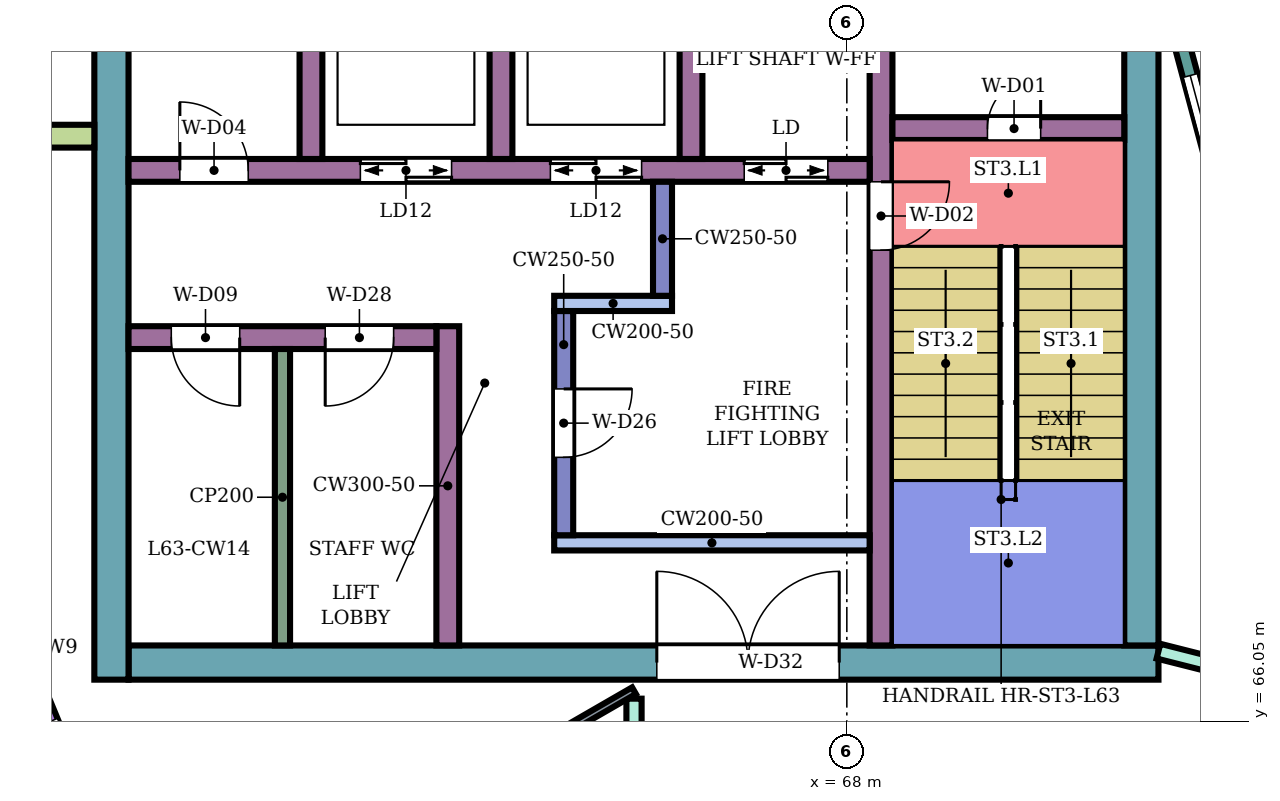
"""IFC4 building model, lengths in metres.
Left out: names, types, materials, properties, quantities, classifications, styles, units other than length and angle.
Written with IfcOpenShell. Run it as: python <this file> out.ifc"""

import sys

from ifc_helpers import new_model, si_unit, direction, frame, frame_2d, origin, place, context, subcontext, project, spatial, rectangle, extrude, element, fill, save


model = new_model("IFC4")
c1 = context("Model", 3, precision=1e-05, world=origin(), true_north=direction((0.0, 1.0)))
c2 = subcontext(c1, "Body", "Model", "MODEL_VIEW")
j1 = project(units=[si_unit("LENGTHUNIT", "METRE"), si_unit("PLANEANGLEUNIT", "RADIAN")], contexts=[c1])
p1 = place(None, origin())
s1 = spatial("IfcSite", under=j1, at=p1, CompositionType="ELEMENT")
p2 = place(p1, origin())
s2 = spatial("IfcBuilding", under=s1, at=p2, CompositionType="ELEMENT")
p3 = place(p2, frame((0.0, 0.0, 275.7)))
s3 = spatial("IfcBuildingStorey", under=s2, at=p3, CompositionType="ELEMENT", Elevation=275.7)
p4 = place(p3, frame((72.1, 66.825, 0.0), z_axis=(0.0, 0.0, 1.0), x_axis=(-1.0, 0.0, 0.0)))
e1 = element("IfcWall", 1, at=p4, inside=s3, PredefinedType="SHEAR", context=c2, shape_type="SweptSolid", body=[
    extrude(rectangle(XDim=13.55, YDim=0.45, at=frame_2d((6.775, 0.0))), origin(), (0.0, 0.0, 1.0), 3.88),
])
p5 = place(p4, frame((4.2, 0.0, 0.0)))
e2 = element("IfcOpeningElement", 2, at=p5, cuts=e1, PredefinedType="OPENING", context=c2, shape_type="SweptSolid", body=[
    extrude(rectangle(XDim=2.4, YDim=2.4, at=frame_2d((1.2, 1.2))), frame((0.0, 0.235, 0.0), z_axis=(0.0, -1.0, 0.0), x_axis=(1.0, 0.0, 0.0)), (0.0, 0.0, 1.0), 0.47),
])
p6 = place(p3, frame((71.875, 75.0, 0.0), z_axis=(0.0, 0.0, 1.0), x_axis=(0.0, -1.0, 0.0)))
e3 = element("IfcWall", 3, at=p6, inside=s3, PredefinedType="SHEAR", context=c2, shape_type="SweptSolid", body=[
    extrude(rectangle(XDim=7.95, YDim=0.45, at=frame_2d((3.975, 0.0))), origin(), (0.0, 0.0, 1.0), 3.88),
])
p7 = place(p3, frame((58.325, 83.4, 0.0), z_axis=(0.0, 0.0, 1.0), x_axis=(0.0, -1.0, 0.0)))
e4 = element("IfcWall", 4, at=p7, inside=s3, PredefinedType="SHEAR", context=c2, shape_type="SweptSolid", body=[
    extrude(rectangle(XDim=16.8, YDim=0.45, at=frame_2d((8.4, 0.0))), origin(), (0.0, 0.0, 1.0), 3.88),
])
p8 = place(p3, frame((68.45, 75.0, 0.0), z_axis=(0.0, 0.0, 1.0), x_axis=(0.0, -1.0, 0.0)))
e5 = element("IfcWall", 5, at=p8, inside=s3, PredefinedType="SHEAR", context=c2, shape_type="SweptSolid", body=[
    extrude(rectangle(XDim=7.95, YDim=0.3, at=frame_2d((3.975, 0.0))), origin(), (0.0, 0.0, 1.0), 3.88),
])
p9 = place(p8, frame((1.85, 0.0, 0.0)))
e6 = element("IfcOpeningElement", 6, at=p9, cuts=e5, PredefinedType="OPENING", context=c2, shape_type="SweptSolid", body=[
    extrude(rectangle(XDim=0.9, YDim=2.1, at=frame_2d((0.45, 1.05))), frame((0.0, 0.16, 0.0), z_axis=(0.0, -1.0, 0.0), x_axis=(1.0, 0.0, 0.0)), (0.0, 0.0, 1.0), 0.32),
])
p10 = place(p3, frame((71.65, 73.85, 0.0), z_axis=(0.0, 0.0, 1.0), x_axis=(-1.0, 0.0, 0.0)))
e7 = element("IfcWall", 7, at=p10, inside=s3, PredefinedType="SHEAR", context=c2, shape_type="SweptSolid", body=[
    extrude(rectangle(XDim=3.05, YDim=0.3, at=frame_2d((1.525, 0.0))), origin(), (0.0, 0.0, 1.0), 3.88),
])
p11 = place(p10, frame((1.1, 0.0, 0.0)))
e8 = element("IfcOpeningElement", 8, at=p11, cuts=e7, PredefinedType="OPENING", context=c2, shape_type="SweptSolid", body=[
    extrude(rectangle(XDim=0.7, YDim=2.0, at=frame_2d((0.35, 1.0))), frame((0.0, 0.16, 0.0), z_axis=(0.0, -1.0, 0.0), x_axis=(1.0, 0.0, 0.0)), (0.0, 0.0, 1.0), 0.32),
])
p12 = place(p3, frame((68.3, 73.3, 0.0), z_axis=(0.0, 0.0, 1.0), x_axis=(-1.0, 0.0, 0.0)))
e9 = element("IfcWall", 9, at=p12, inside=s3, PredefinedType="SHEAR", context=c2, shape_type="SweptSolid", body=[
    extrude(rectangle(XDim=9.75, YDim=0.3, at=frame_2d((4.875, 0.0))), origin(), (0.0, 0.0, 1.0), 3.88),
])
p13 = place(p12, frame((0.55, 0.0, 0.0)))
e10 = element("IfcOpeningElement", 10, at=p13, cuts=e9, PredefinedType="OPENING", context=c2, shape_type="SweptSolid", body=[
    extrude(rectangle(XDim=1.1, YDim=2.1, at=frame_2d((0.55, 1.05))), frame((0.0, 0.16, 0.0), z_axis=(0.0, -1.0, 0.0), x_axis=(1.0, 0.0, 0.0)), (0.0, 0.0, 1.0), 0.32),
])
p14 = place(p12, frame((3.0, 0.0, 0.0)))
e11 = element("IfcOpeningElement", 11, at=p14, cuts=e9, PredefinedType="OPENING", context=c2, shape_type="SweptSolid", body=[
    extrude(rectangle(XDim=1.2, YDim=2.1, at=frame_2d((0.6, 1.05))), frame((0.0, 0.16, 0.0), z_axis=(0.0, -1.0, 0.0), x_axis=(1.0, 0.0, 0.0)), (0.0, 0.0, 1.0), 0.32),
])
p15 = place(p12, frame((5.5, 0.0, 0.0)))
e12 = element("IfcOpeningElement", 12, at=p15, cuts=e9, PredefinedType="OPENING", context=c2, shape_type="SweptSolid", body=[
    extrude(rectangle(XDim=1.2, YDim=2.1, at=frame_2d((0.6, 1.05))), frame((0.0, 0.16, 0.0), z_axis=(0.0, -1.0, 0.0), x_axis=(1.0, 0.0, 0.0)), (0.0, 0.0, 1.0), 0.32),
])
p16 = place(p12, frame((8.175, 0.0, 0.0)))
e13 = element("IfcOpeningElement", 13, at=p16, cuts=e9, PredefinedType="OPENING", context=c2, shape_type="SweptSolid", body=[
    extrude(rectangle(XDim=0.9, YDim=2.1, at=frame_2d((0.45, 1.05))), frame((0.0, 0.16, 0.0), z_axis=(0.0, -1.0, 0.0), x_axis=(1.0, 0.0, 0.0)), (0.0, 0.0, 1.0), 0.32),
])
for number, where, z_axis, x_axis in (
    (14, (65.95, 76.0, 0.0), (0.0, 0.0, 1.0), (0.0, -1.0, 0.0)),
    (15, (63.45, 76.0, 0.0), (0.0, 0.0, 1.0), (0.0, -1.0, 0.0)),
    (16, (60.95, 76.0, 0.0), (0.0, 0.0, 1.0), (0.0, -1.0, 0.0)),
):
    element("IfcWall", number, at=place(p3, frame(where, z_axis=z_axis, x_axis=x_axis)), inside=s3, PredefinedType="SHEAR", context=c2, shape_type="SweptSolid", body=[
        extrude(rectangle(XDim=2.55, YDim=0.3, at=frame_2d((1.275, 0.0))), origin(), (0.0, 0.0, 1.0), 3.88),
    ])
p17 = place(p3, frame((68.3, 68.4, 0.0), z_axis=(0.0, 0.0, 1.0), x_axis=(-1.0, 0.0, 0.0)))
e17 = element("IfcWall", 17, at=p17, inside=s3, PredefinedType="SHEAR", context=c2, shape_type="SweptSolid", body=[
    extrude(rectangle(XDim=4.15, YDim=0.2, at=frame_2d((2.075, 0.0))), origin(), (0.0, 0.0, 1.0), 3.88),
])
p18 = place(p3, frame((64.275, 71.45, 0.0), z_axis=(0.0, 0.0, 1.0), x_axis=(0.0, -1.0, 0.0)))
e18 = element("IfcWall", 18, at=p18, inside=s3, PredefinedType="SHEAR", context=c2, shape_type="SweptSolid", body=[
    extrude(rectangle(XDim=2.95, YDim=0.25, at=frame_2d((1.475, 0.0))), origin(), (0.0, 0.0, 1.0), 3.88),
])
p19 = place(p18, frame((1.025, 0.0, 0.0)))
e19 = element("IfcOpeningElement", 19, at=p19, cuts=e18, PredefinedType="OPENING", context=c2, shape_type="SweptSolid", body=[
    extrude(rectangle(XDim=0.9, YDim=2.1, at=frame_2d((0.45, 1.05))), frame((0.0, 0.135, 0.0), z_axis=(0.0, -1.0, 0.0), x_axis=(1.0, 0.0, 0.0)), (0.0, 0.0, 1.0), 0.27),
])
p20 = place(p3, frame((65.7, 71.55, 0.0), z_axis=(0.0, 0.0, 1.0), x_axis=(-1.0, 0.0, 0.0)))
e20 = element("IfcWall", 20, at=p20, inside=s3, PredefinedType="SHEAR", context=c2, shape_type="SweptSolid", body=[
    extrude(rectangle(XDim=1.55, YDim=0.2, at=frame_2d((0.775, 0.0))), origin(), (0.0, 0.0, 1.0), 3.88),
])
p21 = place(p3, frame((65.575, 73.15, 0.0), z_axis=(0.0, 0.0, 1.0), x_axis=(0.0, -1.0, 0.0)))
e21 = element("IfcWall", 21, at=p21, inside=s3, PredefinedType="SHEAR", context=c2, shape_type="SweptSolid", body=[
    extrude(rectangle(XDim=1.5, YDim=0.25, at=frame_2d((0.75, 0.0))), origin(), (0.0, 0.0, 1.0), 3.88),
])
p22 = place(p3, frame((62.75, 71.25, 0.0), z_axis=(0.0, 0.0, 1.0), x_axis=(0.0, -1.0, 0.0)))
e22 = element("IfcWall", 22, at=p22, inside=s3, PredefinedType="SHEAR", context=c2, shape_type="SweptSolid", body=[
    extrude(rectangle(XDim=4.2, YDim=0.3, at=frame_2d((2.1, 0.0))), origin(), (0.0, 0.0, 1.0), 3.88),
])
p23 = place(p3, frame((62.6, 71.1, 0.0), z_axis=(0.0, 0.0, 1.0), x_axis=(-1.0, 0.0, 0.0)))
e23 = element("IfcWall", 23, at=p23, inside=s3, PredefinedType="SHEAR", context=c2, shape_type="SweptSolid", body=[
    extrude(rectangle(XDim=4.05, YDim=0.3, at=frame_2d((2.025, 0.0))), origin(), (0.0, 0.0, 1.0), 3.88),
])
p24 = place(p23, frame((0.562, 0.0, 0.0)))
e24 = element("IfcOpeningElement", 24, at=p24, cuts=e23, PredefinedType="OPENING", context=c2, shape_type="SweptSolid", body=[
    extrude(rectangle(XDim=0.9, YDim=2.1, at=frame_2d((0.45, 1.05))), frame((0.0, 0.16, 0.0), z_axis=(0.0, -1.0, 0.0), x_axis=(1.0, 0.0, 0.0)), (0.0, 0.0, 1.0), 0.32),
])
p25 = place(p23, frame((2.587, 0.0, 0.0)))
e25 = element("IfcOpeningElement", 25, at=p25, cuts=e23, PredefinedType="OPENING", context=c2, shape_type="SweptSolid", body=[
    extrude(rectangle(XDim=0.9, YDim=2.1, at=frame_2d((0.45, 1.05))), frame((0.0, 0.16, 0.0), z_axis=(0.0, -1.0, 0.0), x_axis=(1.0, 0.0, 0.0)), (0.0, 0.0, 1.0), 0.32),
])
p26 = place(p3, frame((56.432, 68.685, 0.0), z_axis=(0.0, 0.0, 1.0), x_axis=(0.382690319485, -0.923876679743, 0.0)))
e26 = element("IfcWall", 26, at=p26, inside=s3, PredefinedType="NOTDEFINED", context=c2, shape_type="SweptSolid", body=[
    extrude(rectangle(XDim=6.369, YDim=0.2, at=frame_2d((3.185, 0.0))), origin(), (0.0, 0.0, 1.0), 4.2),
])
p27 = place(p26, frame((1.2, 0.0, 0.9)))
e27 = element("IfcOpeningElement", 27, at=p27, cuts=e26, PredefinedType="OPENING", context=c2, shape_type="SweptSolid", body=[
    extrude(rectangle(XDim=1.2, YDim=2.7, at=frame_2d((0.6, 1.35))), frame((0.0, 0.11, 0.0), z_axis=(0.0, -1.0, 0.0), x_axis=(1.0, 0.0, 0.0)), (0.0, 0.0, 1.0), 0.22),
])
p28 = place(p26, frame((2.85, 0.0, 0.0)))
e28 = element("IfcOpeningElement", 28, at=p28, cuts=e26, PredefinedType="OPENING", context=c2, shape_type="SweptSolid", body=[
    extrude(rectangle(XDim=1.8, YDim=2.7, at=frame_2d((0.9, 1.35))), frame((0.0, 0.11, 0.0), z_axis=(0.0, -1.0, 0.0), x_axis=(1.0, 0.0, 0.0)), (0.0, 0.0, 1.0), 0.22),
])
p29 = place(p3, frame((58.1, 73.75, 0.0), z_axis=(0.0, 0.0, 1.0), x_axis=(-1.0, 0.0, 0.0)))
e29 = element("IfcWall", 29, at=p29, inside=s3, PredefinedType="NOTDEFINED", context=c2, shape_type="SweptSolid", body=[
    extrude(rectangle(XDim=2.416, YDim=0.3, at=frame_2d((1.208, 0.0))), origin(), (0.0, 0.0, 1.0), 4.2),
])
p30 = place(p3, frame((72.396, 75.0, 0.0), z_axis=(0.0, 0.0, 1.0), x_axis=(0.258789828301, -0.965933654434, 0.0)))
e30 = element("IfcWall", 30, at=p30, inside=s3, PredefinedType="NOTDEFINED", context=c2, shape_type="SweptSolid", body=[
    extrude(rectangle(XDim=3.936, YDim=0.2, at=frame_2d((1.968, 0.0))), origin(), (0.0, 0.0, 1.0), 4.2),
])
p31 = place(p30, frame((0.468, 0.0, 0.9)))
e31 = element("IfcOpeningElement", 31, at=p31, cuts=e30, PredefinedType="OPENING", context=c2, shape_type="SweptSolid", body=[
    extrude(rectangle(XDim=3.0, YDim=2.3, at=frame_2d((1.5, 1.15))), frame((0.0, 0.11, 0.0), z_axis=(0.0, -1.0, 0.0), x_axis=(1.0, 0.0, 0.0)), (0.0, 0.0, 1.0), 0.22),
])
p32 = place(p3, frame((65.2, 65.2, 0.0), z_axis=(0.0, 0.0, 1.0), x_axis=(0.0, 1.0, 0.0)))
e32 = element("IfcWall", 32, at=p32, inside=s3, PredefinedType="PARTITIONING", context=c2, shape_type="SweptSolid", body=[
    extrude(rectangle(XDim=1.15, YDim=0.2, at=frame_2d((0.575, 0.0))), origin(), (0.0, 0.0, 1.0), 3.75),
])
p33 = place(p3, frame((72.1, 66.975, 0.0), z_axis=(0.0, 0.0, 1.0), x_axis=(0.969471314457, -0.245204752086, 0.0)))
e33 = element("IfcWall", 33, at=p33, inside=s3, PredefinedType="PARTITIONING", context=c2, shape_type="SweptSolid", body=[
    extrude(rectangle(XDim=2.582, YDim=0.2, at=frame_2d((1.291, 0.0))), origin(), (0.0, 0.0, 1.0), 3.75),
])
p34 = place(p33, frame((0.841, 0.0, 0.0)))
e34 = element("IfcOpeningElement", 34, at=p34, cuts=e33, PredefinedType="OPENING", context=c2, shape_type="SweptSolid", body=[
    extrude(rectangle(XDim=0.9, YDim=2.1, at=frame_2d((0.45, 1.05))), frame((0.0, 0.11, 0.0), z_axis=(0.0, -1.0, 0.0), x_axis=(1.0, 0.0, 0.0)), (0.0, 0.0, 1.0), 0.22),
])
p35 = place(p3, frame((58.958, 62.851, 0.0), z_axis=(0.0, 0.0, 1.0), x_axis=(0.866044015472, 0.499967762227, 0.0)))
e35 = element("IfcWall", 35, at=p35, inside=s3, PredefinedType="PARTITIONING", context=c2, shape_type="SweptSolid", body=[
    extrude(rectangle(XDim=7.208, YDim=0.1, at=frame_2d((3.604, 0.0))), origin(), (0.0, 0.0, 1.0), 3.75),
])
p36 = place(p35, frame((3.179, 0.0, 0.0)))
e36 = element("IfcOpeningElement", 36, at=p36, cuts=e35, PredefinedType="OPENING", context=c2, shape_type="SweptSolid", body=[
    extrude(rectangle(XDim=0.9, YDim=2.1, at=frame_2d((0.45, 1.05))), frame((0.0, 0.06, 0.0), z_axis=(0.0, -1.0, 0.0), x_axis=(1.0, 0.0, 0.0)), (0.0, 0.0, 1.0), 0.12),
])
p37 = place(p3, frame((60.575, 70.95, 0.0), z_axis=(0.0, 0.0, 1.0), x_axis=(0.0, -1.0, 0.0)))
e37 = element("IfcWall", 37, at=p37, inside=s3, PredefinedType="PARTITIONING", context=c2, shape_type="SweptSolid", body=[
    extrude(rectangle(XDim=3.9, YDim=0.2, at=frame_2d((1.95, 0.0))), origin(), (0.0, 0.0, 1.0), 3.88),
])
p38 = place(p28, frame((1.8, 0.0, 0.0), z_axis=(0.0, 0.0, 1.0), x_axis=(-1.0, 0.0, 0.0)))
e38 = element("IfcDoor", 38, at=p38, inside=s3, OperationType="DOUBLE_DOOR_SINGLE_SWING", PredefinedType="DOOR", context=c2, shape_type="SweptSolid", body=[
    extrude(rectangle(XDim=1.8, YDim=2.7, at=frame_2d((0.9, 1.35))), frame((0.0, 0.025, 0.0), z_axis=(0.0, -1.0, 0.0), x_axis=(1.0, 0.0, 0.0)), (0.0, 0.0, 1.0), 0.05),
])
fill(e28, e38)
p39 = place(p31, origin())
e39 = element("IfcWindow", 39, at=p39, inside=s3, PartitioningType="SINGLE_PANEL", PredefinedType="WINDOW", context=c2, shape_type="SweptSolid", body=[
    extrude(rectangle(XDim=3.0, YDim=2.3, at=frame_2d((1.5, 1.15))), frame((0.0, 0.03, 0.0), z_axis=(0.0, -1.0, 0.0), x_axis=(1.0, 0.0, 0.0)), (0.0, 0.0, 1.0), 0.06),
])
fill(e31, e39)
p40 = place(p11, frame((0.7, 0.0, 0.0), z_axis=(0.0, 0.0, 1.0), x_axis=(-1.0, 0.0, 0.0)))
e40 = element("IfcDoor", 40, at=p40, inside=s3, OperationType="SINGLE_SWING_RIGHT", PredefinedType="DOOR", context=c2, shape_type="SweptSolid", body=[
    extrude(rectangle(XDim=0.7, YDim=2.0, at=frame_2d((0.35, 1.0))), frame((0.0, 0.025, 0.0), z_axis=(0.0, -1.0, 0.0), x_axis=(1.0, 0.0, 0.0)), (0.0, 0.0, 1.0), 0.05),
])
fill(e8, e40)
p41 = place(p9, origin())
e41 = element("IfcDoor", 41, at=p41, inside=s3, OperationType="SINGLE_SWING_LEFT", PredefinedType="DOOR", context=c2, shape_type="SweptSolid", body=[
    extrude(rectangle(XDim=0.9, YDim=2.1, at=frame_2d((0.45, 1.05))), frame((0.0, 0.025, 0.0), z_axis=(0.0, -1.0, 0.0), x_axis=(1.0, 0.0, 0.0)), (0.0, 0.0, 1.0), 0.05),
])
fill(e6, e41)
p42 = place(p13, origin())
e42 = element("IfcDoor", 42, at=p42, inside=s3, OperationType="DOUBLE_DOOR_SLIDING", PredefinedType="DOOR", context=c2, shape_type="SweptSolid", body=[
    extrude(rectangle(XDim=1.1, YDim=2.1, at=frame_2d((0.55, 1.05))), frame((0.0, 0.025, 0.0), z_axis=(0.0, -1.0, 0.0), x_axis=(1.0, 0.0, 0.0)), (0.0, 0.0, 1.0), 0.05),
])
fill(e10, e42)
p43 = place(p14, origin())
e43 = element("IfcDoor", 43, at=p43, inside=s3, OperationType="DOUBLE_DOOR_SLIDING", PredefinedType="DOOR", context=c2, shape_type="SweptSolid", body=[
    extrude(rectangle(XDim=1.2, YDim=2.1, at=frame_2d((0.6, 1.05))), frame((0.0, 0.025, 0.0), z_axis=(0.0, -1.0, 0.0), x_axis=(1.0, 0.0, 0.0)), (0.0, 0.0, 1.0), 0.05),
])
fill(e11, e43)
p44 = place(p15, origin())
e44 = element("IfcDoor", 44, at=p44, inside=s3, OperationType="DOUBLE_DOOR_SLIDING", PredefinedType="DOOR", context=c2, shape_type="SweptSolid", body=[
    extrude(rectangle(XDim=1.2, YDim=2.1, at=frame_2d((0.6, 1.05))), frame((0.0, 0.025, 0.0), z_axis=(0.0, -1.0, 0.0), x_axis=(1.0, 0.0, 0.0)), (0.0, 0.0, 1.0), 0.05),
])
fill(e12, e44)
p45 = place(p16, frame((0.9, 0.0, 0.0), z_axis=(0.0, 0.0, 1.0), x_axis=(-1.0, 0.0, 0.0)))
e45 = element("IfcDoor", 45, at=p45, inside=s3, OperationType="SINGLE_SWING_LEFT", PredefinedType="DOOR", context=c2, shape_type="SweptSolid", body=[
    extrude(rectangle(XDim=0.9, YDim=2.1, at=frame_2d((0.45, 1.05))), frame((0.0, 0.025, 0.0), z_axis=(0.0, -1.0, 0.0), x_axis=(1.0, 0.0, 0.0)), (0.0, 0.0, 1.0), 0.05),
])
fill(e13, e45)
p46 = place(p19, origin())
e46 = element("IfcDoor", 46, at=p46, inside=s3, OperationType="SINGLE_SWING_LEFT", PredefinedType="DOOR", context=c2, shape_type="SweptSolid", body=[
    extrude(rectangle(XDim=0.9, YDim=2.1, at=frame_2d((0.45, 1.05))), frame((0.0, 0.025, 0.0), z_axis=(0.0, -1.0, 0.0), x_axis=(1.0, 0.0, 0.0)), (0.0, 0.0, 1.0), 0.05),
])
fill(e19, e46)
p47 = place(p24, origin())
e47 = element("IfcDoor", 47, at=p47, inside=s3, OperationType="SINGLE_SWING_RIGHT", PredefinedType="DOOR", context=c2, shape_type="SweptSolid", body=[
    extrude(rectangle(XDim=0.9, YDim=2.1, at=frame_2d((0.45, 1.05))), frame((0.0, 0.025, 0.0), z_axis=(0.0, -1.0, 0.0), x_axis=(1.0, 0.0, 0.0)), (0.0, 0.0, 1.0), 0.05),
])
fill(e24, e47)
p48 = place(p25, origin())
e48 = element("IfcDoor", 48, at=p48, inside=s3, OperationType="SINGLE_SWING_LEFT", PredefinedType="DOOR", context=c2, shape_type="SweptSolid", body=[
    extrude(rectangle(XDim=0.9, YDim=2.1, at=frame_2d((0.45, 1.05))), frame((0.0, 0.025, 0.0), z_axis=(0.0, -1.0, 0.0), x_axis=(1.0, 0.0, 0.0)), (0.0, 0.0, 1.0), 0.05),
])
fill(e25, e48)
p49 = place(p5, frame((2.4, 0.0, 0.0), z_axis=(0.0, 0.0, 1.0), x_axis=(-1.0, 0.0, 0.0)))
e49 = element("IfcDoor", 49, at=p49, inside=s3, OperationType="DOUBLE_DOOR_SINGLE_SWING", PredefinedType="DOOR", context=c2, shape_type="SweptSolid", body=[
    extrude(rectangle(XDim=2.4, YDim=2.4, at=frame_2d((1.2, 1.2))), frame((0.0, 0.025, 0.0), z_axis=(0.0, -1.0, 0.0), x_axis=(1.0, 0.0, 0.0)), (0.0, 0.0, 1.0), 0.05),
])
fill(e2, e49)
save(model, sys.argv[1])
